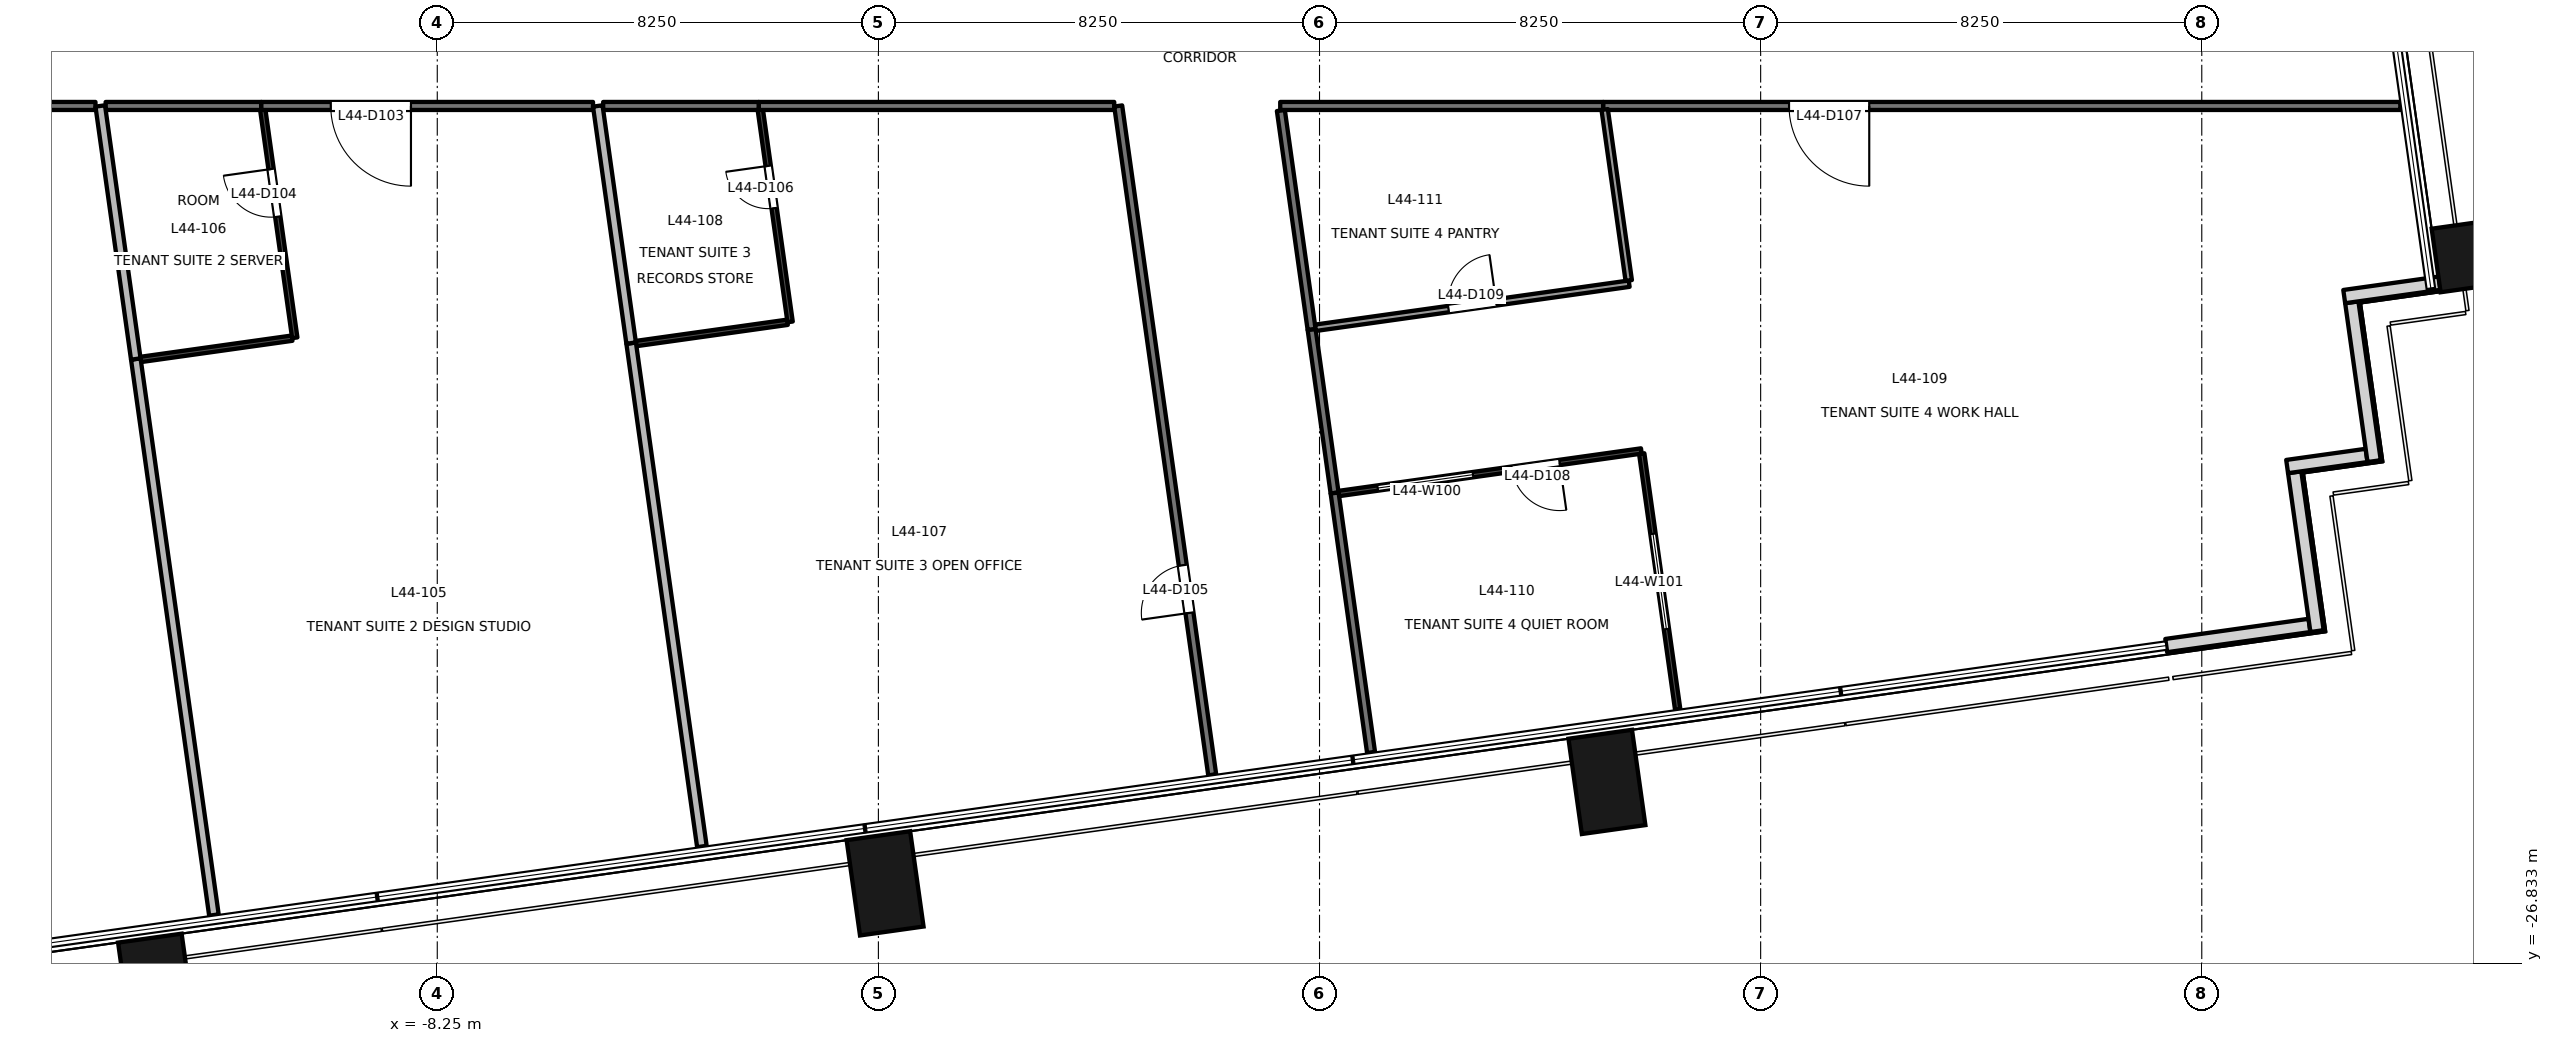
"""IFC4 building model, lengths in metres.
Left out: names, types, materials, properties, quantities, classifications, styles, units other than length and angle.
Written with IfcOpenShell. Run it as: python <this file> out.ifc"""

import sys

from ifc_helpers import new_model, si_unit, direction, frame, frame_2d, origin, origin_2d, place, context, subcontext, project, spatial, rectangle, extrude, element, fill, save


model = new_model("IFC4")
c1 = context("Model", 3, precision=1e-05, world=origin(), true_north=direction((0.0, 1.0)))
c2 = subcontext(c1, "Body", "Model", "MODEL_VIEW")
j1 = project(units=[si_unit("LENGTHUNIT", "METRE"), si_unit("PLANEANGLEUNIT", "RADIAN")], contexts=[c1])
p1 = place(None, origin())
s1 = spatial("IfcSite", under=j1, at=p1, CompositionType="ELEMENT")
p2 = place(p1, origin())
s2 = spatial("IfcBuilding", under=s1, at=p2, CompositionType="ELEMENT")
p3 = place(p2, frame((0.0, 0.0, 191.9)))
s3 = spatial("IfcBuildingStorey", under=s2, at=p3, CompositionType="ELEMENT", Elevation=191.9)
for number, where, z_axis, x_axis in (
    (1, (-13.5, -27.256, -0.2), (0.0, 0.0, 1.0), (0.99, 0.139, 0.0)),
    (2, (0.125, -25.34, -0.2), (0.0, 0.0, 1.0), (0.99, 0.139, 0.0)),
    (3, (13.625, -23.443, -0.2), (0.0, 0.0, 1.0), (0.99, 0.139, 0.0)),
    (4, (30.024, -13.565, -0.2), (0.0, 0.0, 1.0), (-0.139, 0.99, 0.0)),
):
    element("IfcColumn", number, at=place(p3, frame(where, z_axis=z_axis, x_axis=x_axis)), inside=s3, PredefinedType="COLUMN", context=c2, shape_type="SweptSolid", body=[
        extrude(rectangle(XDim=1.2, YDim=1.8, at=origin_2d()), origin(), (0.0, 0.0, 1.0), 3.9),
    ])
p4 = place(p3, frame((24.085, -20.893, 0.0), z_axis=(0.0, 0.0, 1.0), x_axis=(0.990255800966, 0.139260362823, 0.0)))
e5 = element("IfcWall", 5, at=p4, inside=s3, PredefinedType="SOLIDWALL", context=c2, shape_type="SweptSolid", body=[
    extrude(rectangle(XDim=2.705, YDim=0.25, at=frame_2d((1.353, 0.0))), origin(), (0.0, 0.0, 1.0), 3.7),
])
p5 = place(p3, frame((26.905, -20.622, 0.0), z_axis=(0.0, 0.0, 1.0), x_axis=(-0.139313431826, 0.990248336385, 0.0)))
e6 = element("IfcWall", 6, at=p5, inside=s3, PredefinedType="SOLIDWALL", context=c2, shape_type="SweptSolid", body=[
    extrude(rectangle(XDim=3.0, YDim=0.25, at=frame_2d((1.5, 0.0))), origin(), (0.0, 0.0, 1.0), 3.7),
])
p6 = place(p3, frame((26.346, -17.544, 0.0), z_axis=(0.0, 0.0, 1.0), x_axis=(0.990368090482, 0.13845954411, 0.0)))
e7 = element("IfcWall", 7, at=p6, inside=s3, PredefinedType="SOLIDWALL", context=c2, shape_type="SweptSolid", body=[
    extrude(rectangle(XDim=1.5, YDim=0.25, at=frame_2d((0.75, 0.0))), origin(), (0.0, 0.0, 1.0), 3.7),
])
p7 = place(p3, frame((27.973, -17.443, 0.0), z_axis=(0.0, 0.0, 1.0), x_axis=(-0.139313431826, 0.990248336385, 0.0)))
e8 = element("IfcWall", 8, at=p7, inside=s3, PredefinedType="SOLIDWALL", context=c2, shape_type="SweptSolid", body=[
    extrude(rectangle(XDim=3.0, YDim=0.25, at=frame_2d((1.5, 0.0))), origin(), (0.0, 0.0, 1.0), 3.7),
])
p8 = place(p3, frame((27.414, -14.366, 0.0), z_axis=(0.0, 0.0, 1.0), x_axis=(0.990256286673, 0.139256908998, 0.0)))
e9 = element("IfcWall", 9, at=p8, inside=s3, PredefinedType="SOLIDWALL", context=c2, shape_type="SweptSolid", body=[
    extrude(rectangle(XDim=1.801, YDim=0.25, at=frame_2d((0.9, 0.0))), origin(), (0.0, 0.0, 1.0), 3.7),
])
p9 = place(p3, frame((-14.642, -10.8, 0.0), z_axis=(0.0, 0.0, 1.0), x_axis=(-1.0, 0.0, 0.0)))
e10 = element("IfcWall", 10, at=p9, inside=s3, PredefinedType="PARTITIONING", context=c2, shape_type="SweptSolid", body=[
    extrude(rectangle(XDim=5.791, YDim=0.15, at=frame_2d((2.896, 0.0))), origin(), (0.0, 0.0, 1.0), 3.7),
])
p10 = place(p9, frame((2.145, 0.0, 0.0)))
e11 = element("IfcOpeningElement", 11, at=p10, cuts=e10, PredefinedType="OPENING", context=c2, shape_type="SweptSolid", body=[
    extrude(rectangle(XDim=1.5, YDim=2.1, at=frame_2d((0.75, 1.05))), frame((0.0, 0.085, 0.0), z_axis=(0.0, -1.0, 0.0), x_axis=(1.0, 0.0, 0.0)), (0.0, 0.0, 1.0), 0.171),
])
p11 = place(p3, frame((-5.337, -10.8, 0.0), z_axis=(0.0, 0.0, 1.0), x_axis=(-1.0, 0.0, 0.0)))
e12 = element("IfcWall", 12, at=p11, inside=s3, PredefinedType="PARTITIONING", context=c2, shape_type="SweptSolid", body=[
    extrude(rectangle(XDim=6.207, YDim=0.15, at=frame_2d((3.104, 0.0))), origin(), (0.0, 0.0, 1.0), 2.8),
])
p12 = place(p11, frame((3.405, 0.0, 0.0)))
e13 = element("IfcOpeningElement", 13, at=p12, cuts=e12, PredefinedType="OPENING", context=c2, shape_type="SweptSolid", body=[
    extrude(rectangle(XDim=1.5, YDim=2.1, at=frame_2d((0.75, 1.05))), frame((0.0, 0.085, 0.0), z_axis=(0.0, -1.0, 0.0), x_axis=(1.0, 0.0, 0.0)), (0.0, 0.0, 1.0), 0.171),
])
p13 = place(p3, frame((-11.544, -10.8, 0.0), z_axis=(0.0, 0.0, 1.0), x_axis=(-1.0, 0.0, 0.0)))
e14 = element("IfcWall", 14, at=p13, inside=s3, PredefinedType="PARTITIONING", context=c2, shape_type="SweptSolid", body=[
    extrude(rectangle(XDim=2.908, YDim=0.15, at=frame_2d((1.454, 0.0))), origin(), (0.0, 0.0, 1.0), 2.8),
])
p14 = place(p3, frame((4.411, -10.8, 0.0), z_axis=(0.0, 0.0, 1.0), x_axis=(-1.0, 0.0, 0.0)))
e15 = element("IfcWall", 15, at=p14, inside=s3, PredefinedType="PARTITIONING", context=c2, shape_type="SweptSolid", body=[
    extrude(rectangle(XDim=6.65, YDim=0.15, at=frame_2d((3.325, 0.0))), origin(), (0.0, 0.0, 1.0), 2.9),
])
p15 = place(p3, frame((6.243, -23.31, 0.0), z_axis=(0.0, 0.0, 1.0), x_axis=(-0.139145566137, 0.990271938118, 0.0)))
e16 = element("IfcWall", 16, at=p15, inside=s3, PredefinedType="PARTITIONING", context=c2, shape_type="SweptSolid", body=[
    extrude(rectangle(XDim=12.633, YDim=0.15, at=frame_2d((6.316, 0.0))), origin(), (0.0, 0.0, 1.0), 2.9),
])
p16 = place(p15, frame((3.058, 0.0, 0.0)))
e17 = element("IfcOpeningElement", 17, at=p16, cuts=e16, PredefinedType="OPENING", context=c2, shape_type="SweptSolid", body=[
    extrude(rectangle(XDim=0.9, YDim=2.1, at=frame_2d((0.45, 1.05))), frame((0.0, 0.085, 0.0), z_axis=(0.0, -1.0, 0.0), x_axis=(1.0, 0.0, 0.0)), (0.0, 0.0, 1.0), 0.171),
])
p17 = place(p3, frame((-2.239, -10.8, 0.0), z_axis=(0.0, 0.0, 1.0), x_axis=(-1.0, 0.0, 0.0)))
e18 = element("IfcWall", 18, at=p17, inside=s3, PredefinedType="PARTITIONING", context=c2, shape_type="SweptSolid", body=[
    extrude(rectangle(XDim=2.908, YDim=0.15, at=frame_2d((1.454, 0.0))), origin(), (0.0, 0.0, 1.0), 2.9),
])
p18 = place(p3, frame((8.102, -14.979, 0.0), z_axis=(0.0, 0.0, 1.0), x_axis=(0.139131354665, -0.990273934903, 0.0)))
e19 = element("IfcWall", 19, at=p18, inside=s3, PredefinedType="PARTITIONING", context=c2, shape_type="SweptSolid", body=[
    extrude(rectangle(XDim=3.09, YDim=0.15, at=frame_2d((1.545, 0.0))), origin(), (0.0, 0.0, 1.0), 3.7),
])
p19 = place(p3, frame((28.463, -10.8, 0.0), z_axis=(0.0, 0.0, 1.0), x_axis=(-1.0, 0.0, 0.0)))
e20 = element("IfcWall", 20, at=p19, inside=s3, PredefinedType="PARTITIONING", context=c2, shape_type="SweptSolid", body=[
    extrude(rectangle(XDim=14.909, YDim=0.15, at=frame_2d((7.455, 0.0))), origin(), (0.0, 0.0, 1.0), 3.1),
])
p20 = place(p19, frame((9.932, 0.0, 0.0)))
e21 = element("IfcOpeningElement", 21, at=p20, cuts=e20, PredefinedType="OPENING", context=c2, shape_type="SweptSolid", body=[
    extrude(rectangle(XDim=1.5, YDim=2.1, at=frame_2d((0.75, 1.05))), frame((0.0, 0.085, 0.0), z_axis=(0.0, -1.0, 0.0), x_axis=(1.0, 0.0, 0.0)), (0.0, 0.0, 1.0), 0.171),
])
p21 = place(p3, frame((8.532, -18.039, 0.0), z_axis=(0.0, 0.0, 1.0), x_axis=(0.139189187394, -0.990265807808, 0.0)))
e22 = element("IfcWall", 22, at=p21, inside=s3, PredefinedType="PARTITIONING", context=c2, shape_type="SweptSolid", body=[
    extrude(rectangle(XDim=4.901, YDim=0.15, at=frame_2d((2.45, 0.0))), origin(), (0.0, 0.0, 1.0), 3.0),
])
p22 = place(p3, frame((7.527, -10.885, 0.0), z_axis=(0.0, 0.0, 1.0), x_axis=(0.1390729581, -0.990282137739, 0.0)))
e23 = element("IfcWall", 23, at=p22, inside=s3, PredefinedType="PARTITIONING", context=c2, shape_type="SweptSolid", body=[
    extrude(rectangle(XDim=4.134, YDim=0.15, at=frame_2d((2.067, 0.0))), origin(), (0.0, 0.0, 1.0), 3.7),
])
p23 = place(p3, frame((13.554, -10.8, 0.0), z_axis=(0.0, 0.0, 1.0), x_axis=(-1.0, 0.0, 0.0)))
e24 = element("IfcWall", 24, at=p23, inside=s3, PredefinedType="PARTITIONING", context=c2, shape_type="SweptSolid", body=[
    extrude(rectangle(XDim=6.039, YDim=0.15, at=frame_2d((3.02, 0.0))), origin(), (0.0, 0.0, 1.0), 3.0),
])
p24 = place(p3, frame((-13.888, -15.533, 0.0), z_axis=(0.0, 0.0, 1.0), x_axis=(0.139107013986, -0.990277354411, 0.0)))
e25 = element("IfcWall", 25, at=p24, inside=s3, PredefinedType="PARTITIONING", context=c2, shape_type="SweptSolid", body=[
    extrude(rectangle(XDim=10.502, YDim=0.18, at=frame_2d((5.251, 0.0))), origin(), (0.0, 0.0, 1.0), 2.8),
])
p25 = place(p3, frame((-14.553, -10.8, 0.0), z_axis=(0.0, 0.0, 1.0), x_axis=(0.139146821365, -0.990271761742, 0.0)))
e26 = element("IfcWall", 26, at=p25, inside=s3, PredefinedType="PARTITIONING", context=c2, shape_type="SweptSolid", body=[
    extrude(rectangle(XDim=4.779, YDim=0.18, at=frame_2d((2.39, 0.0))), origin(), (0.0, 0.0, 1.0), 3.7),
])
p26 = place(p3, frame((-13.796, -15.541, 0.0), z_axis=(0.0, 0.0, 1.0), x_axis=(0.990263018372, 0.139209031475, 0.0)))
e27 = element("IfcWall", 27, at=p26, inside=s3, PredefinedType="PARTITIONING", context=c2, shape_type="SweptSolid", body=[
    extrude(rectangle(XDim=2.859, YDim=0.1, at=frame_2d((1.429, 0.0))), origin(), (0.0, 0.0, 1.0), 2.8),
])
p27 = place(p3, frame((-10.915, -15.136, 0.0), z_axis=(0.0, 0.0, 1.0), x_axis=(-0.138954517122, 0.990298764097, 0.0)))
e28 = element("IfcWall", 28, at=p27, inside=s3, PredefinedType="PARTITIONING", context=c2, shape_type="SweptSolid", body=[
    extrude(rectangle(XDim=4.31, YDim=0.1, at=frame_2d((2.155, 0.0))), origin(), (0.0, 0.0, 1.0), 3.7),
])
p28 = place(p27, frame((2.287, 0.0, 0.0)))
e29 = element("IfcOpeningElement", 29, at=p28, cuts=e28, PredefinedType="OPENING", context=c2, shape_type="SweptSolid", body=[
    extrude(rectangle(XDim=0.9, YDim=2.1, at=frame_2d((0.45, 1.05))), frame((0.0, 0.061, 0.0), z_axis=(0.0, -1.0, 0.0), x_axis=(1.0, 0.0, 0.0)), (0.0, 0.0, 1.0), 0.121),
])
p29 = place(p3, frame((-4.624, -15.237, 0.0), z_axis=(0.0, 0.0, 1.0), x_axis=(0.13917022879, -0.990268472395, 0.0)))
e30 = element("IfcWall", 30, at=p29, inside=s3, PredefinedType="PARTITIONING", context=c2, shape_type="SweptSolid", body=[
    extrude(rectangle(XDim=9.506, YDim=0.18, at=frame_2d((4.753, 0.0))), origin(), (0.0, 0.0, 1.0), 2.9),
])
p30 = place(p3, frame((-5.248, -10.8, 0.0), z_axis=(0.0, 0.0, 1.0), x_axis=(0.139299923233, -0.990250236752, 0.0)))
e31 = element("IfcWall", 31, at=p30, inside=s3, PredefinedType="PARTITIONING", context=c2, shape_type="SweptSolid", body=[
    extrude(rectangle(XDim=4.48, YDim=0.18, at=frame_2d((2.24, 0.0))), origin(), (0.0, 0.0, 1.0), 2.9),
])
p31 = place(p3, frame((-4.532, -15.244, 0.0), z_axis=(0.0, 0.0, 1.0), x_axis=(0.990264673226, 0.139197259172, 0.0)))
e32 = element("IfcWall", 32, at=p31, inside=s3, PredefinedType="PARTITIONING", context=c2, shape_type="SweptSolid", body=[
    extrude(rectangle(XDim=2.859, YDim=0.1, at=frame_2d((1.429, 0.0))), origin(), (0.0, 0.0, 1.0), 2.9),
])
p32 = place(p3, frame((-1.651, -14.839, 0.0), z_axis=(0.0, 0.0, 1.0), x_axis=(-0.139170879072, 0.990268381005, 0.0)))
e33 = element("IfcWall", 33, at=p32, inside=s3, PredefinedType="PARTITIONING", context=c2, shape_type="SweptSolid", body=[
    extrude(rectangle(XDim=4.01, YDim=0.1, at=frame_2d((2.005, 0.0))), origin(), (0.0, 0.0, 1.0), 3.7),
])
p33 = place(p32, frame((2.147, 0.0, 0.0)))
e34 = element("IfcOpeningElement", 34, at=p33, cuts=e33, PredefinedType="OPENING", context=c2, shape_type="SweptSolid", body=[
    extrude(rectangle(XDim=0.8, YDim=2.1, at=frame_2d((0.4, 1.05))), frame((0.0, 0.061, 0.0), z_axis=(0.0, -1.0, 0.0), x_axis=(1.0, 0.0, 0.0)), (0.0, 0.0, 1.0), 0.121),
])
p34 = place(p3, frame((14.269, -17.253, 0.0), z_axis=(0.0, 0.0, 1.0), x_axis=(-0.990248016247, -0.139315707364, 0.0)))
e35 = element("IfcWall", 35, at=p34, inside=s3, PredefinedType="PARTITIONING", context=c2, shape_type="SweptSolid", body=[
    extrude(rectangle(XDim=5.715, YDim=0.1, at=frame_2d((2.857, 0.0))), origin(), (0.0, 0.0, 1.0), 3.0),
])
p35 = place(p34, frame((1.544, 0.0, 0.0)))
e36 = element("IfcOpeningElement", 36, at=p35, cuts=e35, PredefinedType="OPENING", context=c2, shape_type="SweptSolid", body=[
    extrude(rectangle(XDim=0.9, YDim=2.1, at=frame_2d((0.45, 1.05))), frame((0.0, 0.061, 0.0), z_axis=(0.0, -1.0, 0.0), x_axis=(1.0, 0.0, 0.0)), (0.0, 0.0, 1.0), 0.121),
])
p36 = place(p34, frame((3.18, 0.0, 0.9)))
e37 = element("IfcOpeningElement", 37, at=p36, cuts=e35, PredefinedType="OPENING", context=c2, shape_type="SweptSolid", body=[
    extrude(rectangle(XDim=1.8, YDim=1.2, at=frame_2d((0.9, 0.6))), frame((0.0, 0.061, 0.0), z_axis=(0.0, -1.0, 0.0), x_axis=(1.0, 0.0, 0.0)), (0.0, 0.0, 1.0), 0.121),
])
p37 = place(p3, frame((14.948, -22.085, 0.0), z_axis=(0.0, 0.0, 1.0), x_axis=(-0.139184338849, 0.990266489294, 0.0)))
e38 = element("IfcWall", 38, at=p37, inside=s3, PredefinedType="PARTITIONING", context=c2, shape_type="SweptSolid", body=[
    extrude(rectangle(XDim=4.829, YDim=0.1, at=frame_2d((2.415, 0.0))), origin(), (0.0, 0.0, 1.0), 3.7),
])
p38 = place(p37, frame((1.515, 0.0, 0.9)))
e39 = element("IfcOpeningElement", 39, at=p38, cuts=e38, PredefinedType="OPENING", context=c2, shape_type="SweptSolid", body=[
    extrude(rectangle(XDim=1.8, YDim=1.2, at=frame_2d((0.9, 0.6))), frame((0.0, 0.061, 0.0), z_axis=(0.0, -1.0, 0.0), x_axis=(1.0, 0.0, 0.0)), (0.0, 0.0, 1.0), 0.121),
])
p39 = place(p3, frame((8.174, -14.949, 0.0), z_axis=(0.0, 0.0, 1.0), x_axis=(0.990258620858, 0.139240309595, 0.0)))
e40 = element("IfcWall", 40, at=p39, inside=s3, PredefinedType="PARTITIONING", context=c2, shape_type="SweptSolid", body=[
    extrude(rectangle(XDim=5.925, YDim=0.12, at=frame_2d((2.962, 0.0))), origin(), (0.0, 0.0, 1.0), 3.0),
])
p40 = place(p39, frame((2.513, 0.0, 0.0)))
e41 = element("IfcOpeningElement", 41, at=p40, cuts=e40, PredefinedType="OPENING", context=c2, shape_type="SweptSolid", body=[
    extrude(rectangle(XDim=0.9, YDim=2.1, at=frame_2d((0.45, 1.05))), frame((0.0, 0.071, 0.0), z_axis=(0.0, -1.0, 0.0), x_axis=(1.0, 0.0, 0.0)), (0.0, 0.0, 1.0), 0.141),
])
p41 = place(p3, frame((14.033, -14.065, 0.0), z_axis=(0.0, 0.0, 1.0), x_axis=(-0.139325487292, 0.990246640283, 0.0)))
e42 = element("IfcWall", 42, at=p41, inside=s3, PredefinedType="PARTITIONING", context=c2, shape_type="SweptSolid", body=[
    extrude(rectangle(XDim=3.229, YDim=0.12, at=frame_2d((1.615, 0.0))), origin(), (0.0, 0.0, 1.0), 3.1),
])
p42 = place(p12, origin())
e43 = element("IfcDoor", 43, at=p42, inside=s3, OperationType="DOUBLE_DOOR_SINGLE_SWING", PredefinedType="DOOR", context=c2, shape_type="SweptSolid", body=[
    extrude(rectangle(XDim=1.5, YDim=2.1, at=frame_2d((0.75, 1.05))), frame((0.0, 0.025, 0.0), z_axis=(0.0, -1.0, 0.0), x_axis=(1.0, 0.0, 0.0)), (0.0, 0.0, 1.0), 0.05),
])
fill(e13, e43)
p43 = place(p28, origin())
e44 = element("IfcDoor", 44, at=p43, inside=s3, OperationType="SINGLE_SWING_RIGHT", PredefinedType="DOOR", context=c2, shape_type="SweptSolid", body=[
    extrude(rectangle(XDim=0.9, YDim=2.1, at=frame_2d((0.45, 1.05))), frame((0.0, 0.025, 0.0), z_axis=(0.0, -1.0, 0.0), x_axis=(1.0, 0.0, 0.0)), (0.0, 0.0, 1.0), 0.05),
])
fill(e29, e44)
p44 = place(p16, origin())
e45 = element("IfcDoor", 45, at=p44, inside=s3, OperationType="SINGLE_SWING_LEFT", PredefinedType="DOOR", context=c2, shape_type="SweptSolid", body=[
    extrude(rectangle(XDim=0.9, YDim=2.1, at=frame_2d((0.45, 1.05))), frame((0.0, 0.025, 0.0), z_axis=(0.0, -1.0, 0.0), x_axis=(1.0, 0.0, 0.0)), (0.0, 0.0, 1.0), 0.05),
])
fill(e17, e45)
p45 = place(p33, origin())
e46 = element("IfcDoor", 46, at=p45, inside=s3, OperationType="SINGLE_SWING_RIGHT", PredefinedType="DOOR", context=c2, shape_type="SweptSolid", body=[
    extrude(rectangle(XDim=0.8, YDim=2.1, at=frame_2d((0.4, 1.05))), frame((0.0, 0.025, 0.0), z_axis=(0.0, -1.0, 0.0), x_axis=(1.0, 0.0, 0.0)), (0.0, 0.0, 1.0), 0.05),
])
fill(e34, e46)
p46 = place(p20, origin())
e47 = element("IfcDoor", 47, at=p46, inside=s3, OperationType="DOUBLE_DOOR_SINGLE_SWING", PredefinedType="DOOR", context=c2, shape_type="SweptSolid", body=[
    extrude(rectangle(XDim=1.5, YDim=2.1, at=frame_2d((0.75, 1.05))), frame((0.0, 0.025, 0.0), z_axis=(0.0, -1.0, 0.0), x_axis=(1.0, 0.0, 0.0)), (0.0, 0.0, 1.0), 0.05),
])
fill(e21, e47)
p47 = place(p35, origin())
e48 = element("IfcDoor", 48, at=p47, inside=s3, OperationType="SINGLE_SWING_LEFT", PredefinedType="DOOR", context=c2, shape_type="SweptSolid", body=[
    extrude(rectangle(XDim=0.9, YDim=2.1, at=frame_2d((0.45, 1.05))), frame((0.0, 0.025, 0.0), z_axis=(0.0, -1.0, 0.0), x_axis=(1.0, 0.0, 0.0)), (0.0, 0.0, 1.0), 0.05),
])
fill(e36, e48)
p48 = place(p40, origin())
e49 = element("IfcDoor", 49, at=p48, inside=s3, OperationType="SINGLE_SWING_RIGHT", PredefinedType="DOOR", context=c2, shape_type="SweptSolid", body=[
    extrude(rectangle(XDim=0.9, YDim=2.1, at=frame_2d((0.45, 1.05))), frame((0.0, 0.025, 0.0), z_axis=(0.0, -1.0, 0.0), x_axis=(1.0, 0.0, 0.0)), (0.0, 0.0, 1.0), 0.05),
])
fill(e41, e49)
p49 = place(p36, origin())
e50 = element("IfcWindow", 50, at=p49, inside=s3, PartitioningType="SINGLE_PANEL", PredefinedType="WINDOW", context=c2, shape_type="SweptSolid", body=[
    extrude(rectangle(XDim=1.8, YDim=1.2, at=frame_2d((0.9, 0.6))), frame((0.0, 0.03, 0.0), z_axis=(0.0, -1.0, 0.0), x_axis=(1.0, 0.0, 0.0)), (0.0, 0.0, 1.0), 0.06),
])
fill(e37, e50)
p50 = place(p38, origin())
e51 = element("IfcWindow", 51, at=p50, inside=s3, PartitioningType="SINGLE_PANEL", PredefinedType="WINDOW", context=c2, shape_type="SweptSolid", body=[
    extrude(rectangle(XDim=1.8, YDim=1.2, at=frame_2d((0.9, 0.6))), frame((0.0, 0.03, 0.0), z_axis=(0.0, -1.0, 0.0), x_axis=(1.0, 0.0, 0.0)), (0.0, 0.0, 1.0), 0.06),
])
fill(e39, e51)
save(model, sys.argv[1])
